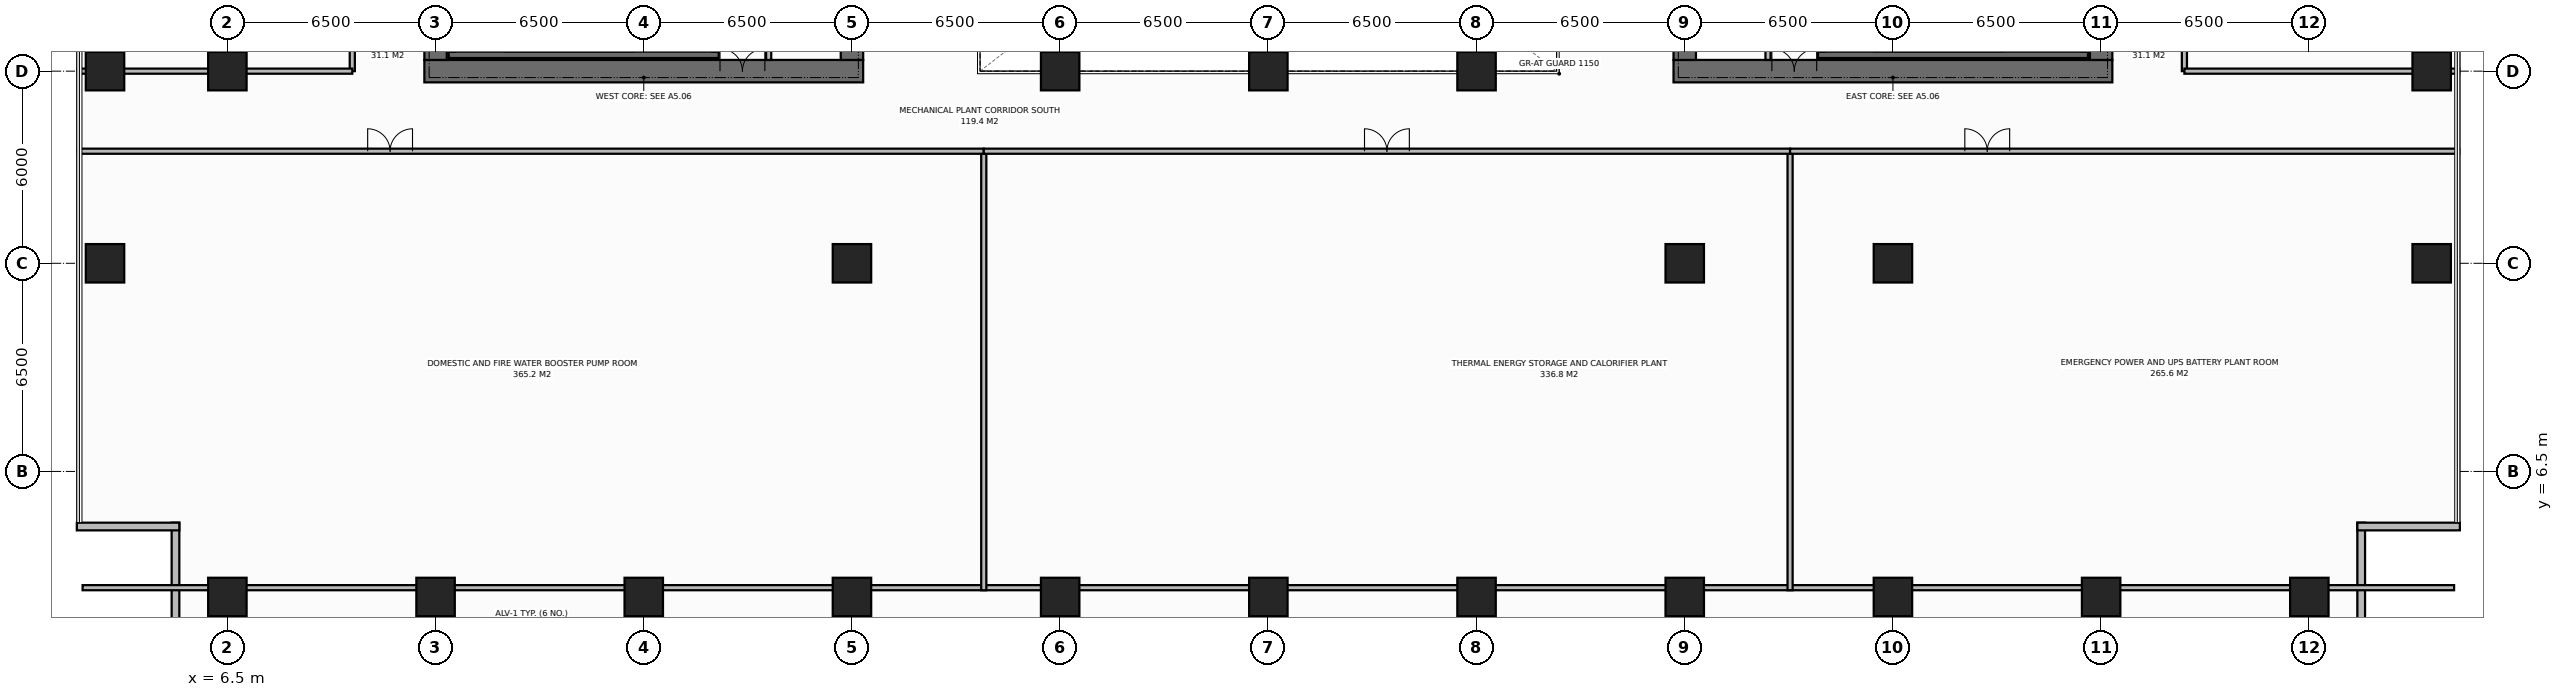
"""IFC4 building model, lengths in metres.
Left out: names, types, materials, properties, quantities, classifications, styles, units other than length and angle.
Written with IfcOpenShell. Run it as: python <this file> out.ifc"""

import sys

from ifc_helpers import new_model, si_unit, direction, frame, frame_2d, origin, origin_2d, place, context, subcontext, project, spatial, rectangle, extrude, element, fill, save


model = new_model("IFC4")
c1 = context("Model", 3, precision=1e-05, world=origin(), true_north=direction((0.0, 1.0)))
c2 = subcontext(c1, "Body", "Model", "MODEL_VIEW")
j1 = project(units=[si_unit("LENGTHUNIT", "METRE"), si_unit("PLANEANGLEUNIT", "RADIAN")], contexts=[c1])
p1 = place(None, origin())
s1 = spatial("IfcSite", under=j1, at=p1, CompositionType="ELEMENT")
p2 = place(p1, origin())
s2 = spatial("IfcBuilding", under=s1, at=p2, CompositionType="ELEMENT")
p3 = place(p2, frame((0.0, 0.0, 139.2)))
s3 = spatial("IfcBuildingStorey", under=s2, at=p3, CompositionType="ELEMENT", Elevation=139.2)
p4 = place(p3, frame((12.65, 19.0, 0.0), z_axis=(0.0, 0.0, 1.0), x_axis=(1.0, 0.0, 0.0)))
e1 = element("IfcWall", 1, at=p4, inside=s3, PredefinedType="SHEAR", context=c2, shape_type="SweptSolid", body=[
    extrude(rectangle(XDim=13.7, YDim=0.7, at=frame_2d((6.85, 0.0))), origin(), (0.0, 0.0, 1.0), 5.0),
])
p5 = place(p4, frame((9.23, 0.0, 0.0)))
e2 = element("IfcOpeningElement", 2, at=p5, cuts=e1, PredefinedType="OPENING", context=c2, shape_type="SweptSolid", body=[
    extrude(rectangle(XDim=1.4, YDim=2.2, at=frame_2d((0.7, 1.1))), frame((0.0, 0.36, 0.0), z_axis=(0.0, -1.0, 0.0), x_axis=(1.0, 0.0, 0.0)), (0.0, 0.0, 1.0), 0.72),
])
p6 = place(p3, frame((13.0, 19.35, 0.0), z_axis=(0.0, 0.0, 1.0), x_axis=(0.0, 1.0, 0.0)))
e3 = element("IfcWall", 3, at=p6, inside=s3, PredefinedType="SHEAR", context=c2, shape_type="SweptSolid", body=[
    extrude(rectangle(XDim=13.3, YDim=0.7, at=frame_2d((6.65, 0.0))), origin(), (0.0, 0.0, 1.0), 5.0),
])
p7 = place(p6, frame((4.7, 0.0, 0.0)))
e4 = element("IfcOpeningElement", 4, at=p7, cuts=e3, PredefinedType="OPENING", context=c2, shape_type="SweptSolid", body=[
    extrude(rectangle(XDim=1.4, YDim=2.2, at=frame_2d((0.7, 1.1))), frame((0.0, 0.36, 0.0), z_axis=(0.0, -1.0, 0.0), x_axis=(1.0, 0.0, 0.0)), (0.0, 0.0, 1.0), 0.72),
])
p8 = place(p3, frame((26.0, 19.35, 0.0), z_axis=(0.0, 0.0, 1.0), x_axis=(0.0, 1.0, 0.0)))
e5 = element("IfcWall", 5, at=p8, inside=s3, PredefinedType="SHEAR", context=c2, shape_type="SweptSolid", body=[
    extrude(rectangle(XDim=13.3, YDim=0.7, at=frame_2d((6.65, 0.0))), origin(), (0.0, 0.0, 1.0), 5.0),
])
p9 = place(p3, frame((51.65, 19.0, 0.0), z_axis=(0.0, 0.0, 1.0), x_axis=(1.0, 0.0, 0.0)))
e6 = element("IfcWall", 6, at=p9, inside=s3, PredefinedType="SHEAR", context=c2, shape_type="SweptSolid", body=[
    extrude(rectangle(XDim=13.7, YDim=0.7, at=frame_2d((6.85, 0.0))), origin(), (0.0, 0.0, 1.0), 5.0),
])
p10 = place(p9, frame((3.07, 0.0, 0.0)))
e7 = element("IfcOpeningElement", 7, at=p10, cuts=e6, PredefinedType="OPENING", context=c2, shape_type="SweptSolid", body=[
    extrude(rectangle(XDim=1.4, YDim=2.2, at=frame_2d((0.7, 1.1))), frame((0.0, 0.36, 0.0), z_axis=(0.0, -1.0, 0.0), x_axis=(1.0, 0.0, 0.0)), (0.0, 0.0, 1.0), 0.72),
])
p11 = place(p3, frame((52.0, 19.35, 0.0), z_axis=(0.0, 0.0, 1.0), x_axis=(0.0, 1.0, 0.0)))
e8 = element("IfcWall", 8, at=p11, inside=s3, PredefinedType="SHEAR", context=c2, shape_type="SweptSolid", body=[
    extrude(rectangle(XDim=13.3, YDim=0.7, at=frame_2d((6.65, 0.0))), origin(), (0.0, 0.0, 1.0), 5.0),
])
p12 = place(p3, frame((65.0, 19.35, 0.0), z_axis=(0.0, 0.0, 1.0), x_axis=(0.0, 1.0, 0.0)))
e9 = element("IfcWall", 9, at=p12, inside=s3, PredefinedType="SHEAR", context=c2, shape_type="SweptSolid", body=[
    extrude(rectangle(XDim=13.3, YDim=0.7, at=frame_2d((6.65, 0.0))), origin(), (0.0, 0.0, 1.0), 5.0),
])
p13 = place(p12, frame((8.1, 0.0, 0.0)))
e10 = element("IfcOpeningElement", 10, at=p13, cuts=e9, PredefinedType="OPENING", context=c2, shape_type="SweptSolid", body=[
    extrude(rectangle(XDim=1.3, YDim=2.2, at=frame_2d((0.65, 1.1))), frame((0.0, 0.36, 0.0), z_axis=(0.0, -1.0, 0.0), x_axis=(1.0, 0.0, 0.0)), (0.0, 0.0, 1.0), 0.72),
])
for number, where, z_axis, x_axis in (
    (11, (13.41, 19.51, 0.0), (0.0, 0.0, 1.0), (1.0, 0.0, 0.0)),
    (12, (56.16, 19.51, 0.0), (0.0, 0.0, 1.0), (1.0, 0.0, 0.0)),
):
    element("IfcWall", number, at=place(p3, frame(where, z_axis=z_axis, x_axis=x_axis)), inside=s3, PredefinedType="SHEAR", context=c2, shape_type="SweptSolid", body=[
        extrude(rectangle(XDim=8.43, YDim=0.2, at=frame_2d((4.215, 0.0))), origin(), (0.0, 0.0, 1.0), 5.0),
    ])
for number, where, z_axis, x_axis in (
    (13, (58.5, 13.0, 0.0), (0.0, 0.0, 1.0), (1.0, 0.0, 0.0)),
    (14, (6.5, 19.0, 0.0), (0.0, 0.0, 1.0), (1.0, 0.0, 0.0)),
    (15, (32.5, 19.0, 0.0), (0.0, 0.0, 1.0), (1.0, 0.0, 0.0)),
    (16, (39.0, 19.0, 0.0), (0.0, 0.0, 1.0), (1.0, 0.0, 0.0)),
    (17, (45.5, 19.0, 0.0), (0.0, 0.0, 1.0), (1.0, 0.0, 0.0)),
    (18, (26.0, 13.0, 0.0), (0.0, 0.0, 1.0), (1.0, 0.0, 0.0)),
    (19, (52.0, 13.0, 0.0), (0.0, 0.0, 1.0), (1.0, 0.0, 0.0)),
    (20, (6.5, 2.58, 0.0), (0.0, 0.0, 1.0), (1.0, 0.0, 0.0)),
    (21, (13.0, 2.58, 0.0), (0.0, 0.0, 1.0), (1.0, 0.0, 0.0)),
    (22, (19.5, 2.58, 0.0), (0.0, 0.0, 1.0), (1.0, 0.0, 0.0)),
    (23, (26.0, 2.58, 0.0), (0.0, 0.0, 1.0), (1.0, 0.0, 0.0)),
    (24, (32.5, 2.58, 0.0), (0.0, 0.0, 1.0), (1.0, 0.0, 0.0)),
    (25, (39.0, 2.58, 0.0), (0.0, 0.0, 1.0), (1.0, 0.0, 0.0)),
    (26, (45.5, 2.58, 0.0), (0.0, 0.0, 1.0), (1.0, 0.0, 0.0)),
    (27, (52.0, 2.58, 0.0), (0.0, 0.0, 1.0), (1.0, 0.0, 0.0)),
    (28, (58.5, 2.58, 0.0), (0.0, 0.0, 1.0), (1.0, 0.0, 0.0)),
    (29, (65.0, 2.58, 0.0), (0.0, 0.0, 1.0), (1.0, 0.0, 0.0)),
    (30, (71.5, 2.58, 0.0), (0.0, 0.0, 1.0), (1.0, 0.0, 0.0)),
    (31, (2.68, 13.0, 0.0), (0.0, 0.0, 1.0), (1.0, 0.0, 0.0)),
    (32, (75.32, 13.0, 0.0), (0.0, 0.0, 1.0), (1.0, 0.0, 0.0)),
    (33, (2.68, 19.0, 0.0), (0.0, 0.0, 1.0), (1.0, 0.0, 0.0)),
    (34, (75.32, 19.0, 0.0), (0.0, 0.0, 1.0), (1.0, 0.0, 0.0)),
):
    element("IfcColumn", number, at=place(p3, frame(where, z_axis=z_axis, x_axis=x_axis)), inside=s3, PredefinedType="COLUMN", context=c2, shape_type="SweptSolid", body=[
        extrude(rectangle(XDim=1.2, YDim=1.2, at=origin_2d()), origin(), (0.0, 0.0, 1.0), 5.0),
    ])
for number, where, z_axis, x_axis in (
    (35, (4.88, 1.7, 0.0), (0.0, 0.0, 1.0), (0.0, 1.0, 0.0)),
    (36, (5.0, 4.78, 0.0), (0.0, 0.0, 1.0), (-1.0, 0.0, 0.0)),
    (37, (73.12, 4.9, 0.0), (0.0, 0.0, 1.0), (0.0, -1.0, 0.0)),
    (38, (76.2, 4.78, 0.0), (0.0, 0.0, 1.0), (-1.0, 0.0, 0.0)),
):
    element("IfcWall", number, at=place(p3, frame(where, z_axis=z_axis, x_axis=x_axis)), inside=s3, PredefinedType="STANDARD", context=c2, shape_type="SweptSolid", body=[
        extrude(rectangle(XDim=3.2, YDim=0.24, at=frame_2d((1.6, 0.0))), origin(), (0.0, 0.0, 1.0), 4.772),
    ])
p14 = place(p3, frame((23.4, 19.35, 0.0), z_axis=(0.0, 0.0, 1.0), x_axis=(0.0, 1.0, 0.0)))
e39 = element("IfcWall", 39, at=p14, inside=s3, PredefinedType="STANDARD", context=c2, shape_type="SweptSolid", body=[
    extrude(rectangle(XDim=13.3, YDim=0.16, at=frame_2d((6.65, 0.0))), origin(), (0.0, 0.0, 1.0), 4.772),
])
p15 = place(p14, frame((1.65, 0.0, 0.0)))
e40 = element("IfcOpeningElement", 40, at=p15, cuts=e39, PredefinedType="OPENING", context=c2, shape_type="SweptSolid", body=[
    extrude(rectangle(XDim=0.95, YDim=2.15, at=frame_2d((0.475, 1.075))), frame((0.0, 0.09, 0.0), z_axis=(0.0, -1.0, 0.0), x_axis=(1.0, 0.0, 0.0)), (0.0, 0.0, 1.0), 0.18),
])
p16 = place(p14, frame((4.95, 0.0, 0.0)))
e41 = element("IfcOpeningElement", 41, at=p16, cuts=e39, PredefinedType="OPENING", context=c2, shape_type="SweptSolid", body=[
    extrude(rectangle(XDim=1.1, YDim=2.2, at=frame_2d((0.55, 1.1))), frame((0.0, 0.09, 0.0), z_axis=(0.0, -1.0, 0.0), x_axis=(1.0, 0.0, 0.0)), (0.0, 0.0, 1.0), 0.18),
])
p17 = place(p14, frame((7.1, 0.0, 0.0)))
e42 = element("IfcOpeningElement", 42, at=p17, cuts=e39, PredefinedType="OPENING", context=c2, shape_type="SweptSolid", body=[
    extrude(rectangle(XDim=1.1, YDim=2.2, at=frame_2d((0.55, 1.1))), frame((0.0, 0.09, 0.0), z_axis=(0.0, -1.0, 0.0), x_axis=(1.0, 0.0, 0.0)), (0.0, 0.0, 1.0), 0.18),
])
p18 = place(p3, frame((54.6, 19.35, 0.0), z_axis=(0.0, 0.0, 1.0), x_axis=(0.0, 1.0, 0.0)))
e43 = element("IfcWall", 43, at=p18, inside=s3, PredefinedType="STANDARD", context=c2, shape_type="SweptSolid", body=[
    extrude(rectangle(XDim=13.3, YDim=0.16, at=frame_2d((6.65, 0.0))), origin(), (0.0, 0.0, 1.0), 4.772),
])
p19 = place(p18, frame((1.65, 0.0, 0.0)))
e44 = element("IfcOpeningElement", 44, at=p19, cuts=e43, PredefinedType="OPENING", context=c2, shape_type="SweptSolid", body=[
    extrude(rectangle(XDim=0.95, YDim=2.15, at=frame_2d((0.475, 1.075))), frame((0.0, 0.09, 0.0), z_axis=(0.0, -1.0, 0.0), x_axis=(1.0, 0.0, 0.0)), (0.0, 0.0, 1.0), 0.18),
])
p20 = place(p18, frame((4.95, 0.0, 0.0)))
e45 = element("IfcOpeningElement", 45, at=p20, cuts=e43, PredefinedType="OPENING", context=c2, shape_type="SweptSolid", body=[
    extrude(rectangle(XDim=1.1, YDim=2.2, at=frame_2d((0.55, 1.1))), frame((0.0, 0.09, 0.0), z_axis=(0.0, -1.0, 0.0), x_axis=(1.0, 0.0, 0.0)), (0.0, 0.0, 1.0), 0.18),
])
p21 = place(p18, frame((7.1, 0.0, 0.0)))
e46 = element("IfcOpeningElement", 46, at=p21, cuts=e43, PredefinedType="OPENING", context=c2, shape_type="SweptSolid", body=[
    extrude(rectangle(XDim=1.1, YDim=2.2, at=frame_2d((0.55, 1.1))), frame((0.0, 0.09, 0.0), z_axis=(0.0, -1.0, 0.0), x_axis=(1.0, 0.0, 0.0)), (0.0, 0.0, 1.0), 0.18),
])
p22 = place(p3, frame((1.98, 2.87, 0.0), z_axis=(0.0, 0.0, 1.0), x_axis=(1.0, 0.0, 0.0)))
e47 = element("IfcWall", 47, at=p22, inside=s3, PredefinedType="STANDARD", context=c2, shape_type="SweptSolid", body=[
    extrude(rectangle(XDim=74.04, YDim=0.16, at=frame_2d((37.02, 0.0))), origin(), (0.0, 0.0, 1.0), 4.772),
])
p23 = place(p3, frame((10.4, 19.0, 0.0), z_axis=(0.0, 0.0, 1.0), x_axis=(0.0, 1.0, 0.0)))
e48 = element("IfcWall", 48, at=p23, inside=s3, PredefinedType="STANDARD", context=c2, shape_type="SweptSolid", body=[
    extrude(rectangle(XDim=14.0, YDim=0.16, at=frame_2d((7.0, 0.0))), origin(), (0.0, 0.0, 1.0), 4.772),
])
p24 = place(p23, frame((5.2, 0.0, 0.0)))
e49 = element("IfcOpeningElement", 49, at=p24, cuts=e48, PredefinedType="OPENING", context=c2, shape_type="SweptSolid", body=[
    extrude(rectangle(XDim=1.4, YDim=2.2, at=frame_2d((0.7, 1.1))), frame((0.0, 0.09, 0.0), z_axis=(0.0, -1.0, 0.0), x_axis=(1.0, 0.0, 0.0)), (0.0, 0.0, 1.0), 0.18),
])
p25 = place(p3, frame((1.82, 19.0, 0.0), z_axis=(0.0, 0.0, 1.0), x_axis=(1.0, 0.0, 0.0)))
e50 = element("IfcWall", 50, at=p25, inside=s3, PredefinedType="STANDARD", context=c2, shape_type="SweptSolid", body=[
    extrude(rectangle(XDim=8.58, YDim=0.16, at=frame_2d((4.29, 0.0))), origin(), (0.0, 0.0, 1.0), 3.252),
])
p26 = place(p3, frame((67.6, 19.0, 0.0), z_axis=(0.0, 0.0, 1.0), x_axis=(0.0, 1.0, 0.0)))
e51 = element("IfcWall", 51, at=p26, inside=s3, PredefinedType="STANDARD", context=c2, shape_type="SweptSolid", body=[
    extrude(rectangle(XDim=14.0, YDim=0.16, at=frame_2d((7.0, 0.0))), origin(), (0.0, 0.0, 1.0), 4.772),
])
p27 = place(p26, frame((5.2, 0.0, 0.0)))
e52 = element("IfcOpeningElement", 52, at=p27, cuts=e51, PredefinedType="OPENING", context=c2, shape_type="SweptSolid", body=[
    extrude(rectangle(XDim=1.4, YDim=2.2, at=frame_2d((0.7, 1.1))), frame((0.0, 0.09, 0.0), z_axis=(0.0, -1.0, 0.0), x_axis=(1.0, 0.0, 0.0)), (0.0, 0.0, 1.0), 0.18),
])
p28 = place(p3, frame((67.6, 19.0, 0.0), z_axis=(0.0, 0.0, 1.0), x_axis=(1.0, 0.0, 0.0)))
e53 = element("IfcWall", 53, at=p28, inside=s3, PredefinedType="STANDARD", context=c2, shape_type="SweptSolid", body=[
    extrude(rectangle(XDim=8.58, YDim=0.16, at=frame_2d((4.29, 0.0))), origin(), (0.0, 0.0, 1.0), 3.252),
])
p29 = place(p3, frame((30.115, 2.79, 0.0), z_axis=(0.0, 0.0, 1.0), x_axis=(0.0, 1.0, 0.0)))
e54 = element("IfcWall", 54, at=p29, inside=s3, PredefinedType="STANDARD", context=c2, shape_type="SweptSolid", body=[
    extrude(rectangle(XDim=13.71, YDim=0.16, at=frame_2d((6.855, 0.0))), origin(), (0.0, 0.0, 1.0), 4.772),
])
p30 = place(p3, frame((1.82, 16.5, 0.0), z_axis=(0.0, 0.0, 1.0), x_axis=(1.0, 0.0, 0.0)))
e55 = element("IfcWall", 55, at=p30, inside=s3, PredefinedType="STANDARD", context=c2, shape_type="SweptSolid", body=[
    extrude(rectangle(XDim=28.295, YDim=0.16, at=frame_2d((14.147, 0.0))), origin(), (0.0, 0.0, 1.0), 4.772),
])
p31 = place(p30, frame((9.06, 0.0, 0.0)))
e56 = element("IfcOpeningElement", 56, at=p31, cuts=e55, PredefinedType="OPENING", context=c2, shape_type="SweptSolid", body=[
    extrude(rectangle(XDim=1.4, YDim=2.2, at=frame_2d((0.7, 1.1))), frame((0.0, 0.09, 0.0), z_axis=(0.0, -1.0, 0.0), x_axis=(1.0, 0.0, 0.0)), (0.0, 0.0, 1.0), 0.18),
])
p32 = place(p3, frame((55.289, 2.79, 0.0), z_axis=(0.0, 0.0, 1.0), x_axis=(0.0, 1.0, 0.0)))
e57 = element("IfcWall", 57, at=p32, inside=s3, PredefinedType="STANDARD", context=c2, shape_type="SweptSolid", body=[
    extrude(rectangle(XDim=13.71, YDim=0.16, at=frame_2d((6.855, 0.0))), origin(), (0.0, 0.0, 1.0), 4.772),
])
p33 = place(p3, frame((30.115, 16.5, 0.0), z_axis=(0.0, 0.0, 1.0), x_axis=(1.0, 0.0, 0.0)))
e58 = element("IfcWall", 58, at=p33, inside=s3, PredefinedType="STANDARD", context=c2, shape_type="SweptSolid", body=[
    extrude(rectangle(XDim=25.174, YDim=0.16, at=frame_2d((12.587, 0.0))), origin(), (0.0, 0.0, 1.0), 4.772),
])
p34 = place(p33, frame((11.887, 0.0, 0.0)))
e59 = element("IfcOpeningElement", 59, at=p34, cuts=e58, PredefinedType="OPENING", context=c2, shape_type="SweptSolid", body=[
    extrude(rectangle(XDim=1.4, YDim=2.2, at=frame_2d((0.7, 1.1))), frame((0.0, 0.09, 0.0), z_axis=(0.0, -1.0, 0.0), x_axis=(1.0, 0.0, 0.0)), (0.0, 0.0, 1.0), 0.18),
])
p35 = place(p3, frame((55.289, 16.5, 0.0), z_axis=(0.0, 0.0, 1.0), x_axis=(1.0, 0.0, 0.0)))
e60 = element("IfcWall", 60, at=p35, inside=s3, PredefinedType="STANDARD", context=c2, shape_type="SweptSolid", body=[
    extrude(rectangle(XDim=20.891, YDim=0.16, at=frame_2d((10.446, 0.0))), origin(), (0.0, 0.0, 1.0), 4.772),
])
p36 = place(p35, frame((5.456, 0.0, 0.0)))
e61 = element("IfcOpeningElement", 61, at=p36, cuts=e60, PredefinedType="OPENING", context=c2, shape_type="SweptSolid", body=[
    extrude(rectangle(XDim=1.4, YDim=2.2, at=frame_2d((0.7, 1.1))), frame((0.0, 0.09, 0.0), z_axis=(0.0, -1.0, 0.0), x_axis=(1.0, 0.0, 0.0)), (0.0, 0.0, 1.0), 0.18),
])
p37 = place(p5, origin())
e62 = element("IfcDoor", 62, at=p37, inside=s3, OperationType="DOUBLE_DOOR_SINGLE_SWING", PredefinedType="DOOR", context=c2, shape_type="SweptSolid", body=[
    extrude(rectangle(XDim=1.4, YDim=2.2, at=frame_2d((0.7, 1.1))), frame((0.0, 0.125, 0.0), z_axis=(0.0, -1.0, 0.0), x_axis=(1.0, 0.0, 0.0)), (0.0, 0.0, 1.0), 0.05),
])
fill(e2, e62)
p38 = place(p10, origin())
e63 = element("IfcDoor", 63, at=p38, inside=s3, OperationType="DOUBLE_DOOR_SINGLE_SWING", PredefinedType="DOOR", context=c2, shape_type="SweptSolid", body=[
    extrude(rectangle(XDim=1.4, YDim=2.2, at=frame_2d((0.7, 1.1))), frame((0.0, 0.125, 0.0), z_axis=(0.0, -1.0, 0.0), x_axis=(1.0, 0.0, 0.0)), (0.0, 0.0, 1.0), 0.05),
])
fill(e7, e63)
p39 = place(p31, origin())
e64 = element("IfcDoor", 64, at=p39, inside=s3, OperationType="DOUBLE_DOOR_SINGLE_SWING", PredefinedType="DOOR", context=c2, shape_type="SweptSolid", body=[
    extrude(rectangle(XDim=1.4, YDim=2.2, at=frame_2d((0.7, 1.1))), frame((0.0, 0.025, 0.0), z_axis=(0.0, -1.0, 0.0), x_axis=(1.0, 0.0, 0.0)), (0.0, 0.0, 1.0), 0.05),
])
fill(e56, e64)
p40 = place(p34, origin())
e65 = element("IfcDoor", 65, at=p40, inside=s3, OperationType="DOUBLE_DOOR_SINGLE_SWING", PredefinedType="DOOR", context=c2, shape_type="SweptSolid", body=[
    extrude(rectangle(XDim=1.4, YDim=2.2, at=frame_2d((0.7, 1.1))), frame((0.0, 0.025, 0.0), z_axis=(0.0, -1.0, 0.0), x_axis=(1.0, 0.0, 0.0)), (0.0, 0.0, 1.0), 0.05),
])
fill(e59, e65)
p41 = place(p36, origin())
e66 = element("IfcDoor", 66, at=p41, inside=s3, OperationType="DOUBLE_DOOR_SINGLE_SWING", PredefinedType="DOOR", context=c2, shape_type="SweptSolid", body=[
    extrude(rectangle(XDim=1.4, YDim=2.2, at=frame_2d((0.7, 1.1))), frame((0.0, 0.025, 0.0), z_axis=(0.0, -1.0, 0.0), x_axis=(1.0, 0.0, 0.0)), (0.0, 0.0, 1.0), 0.05),
])
fill(e61, e66)
save(model, sys.argv[1])
